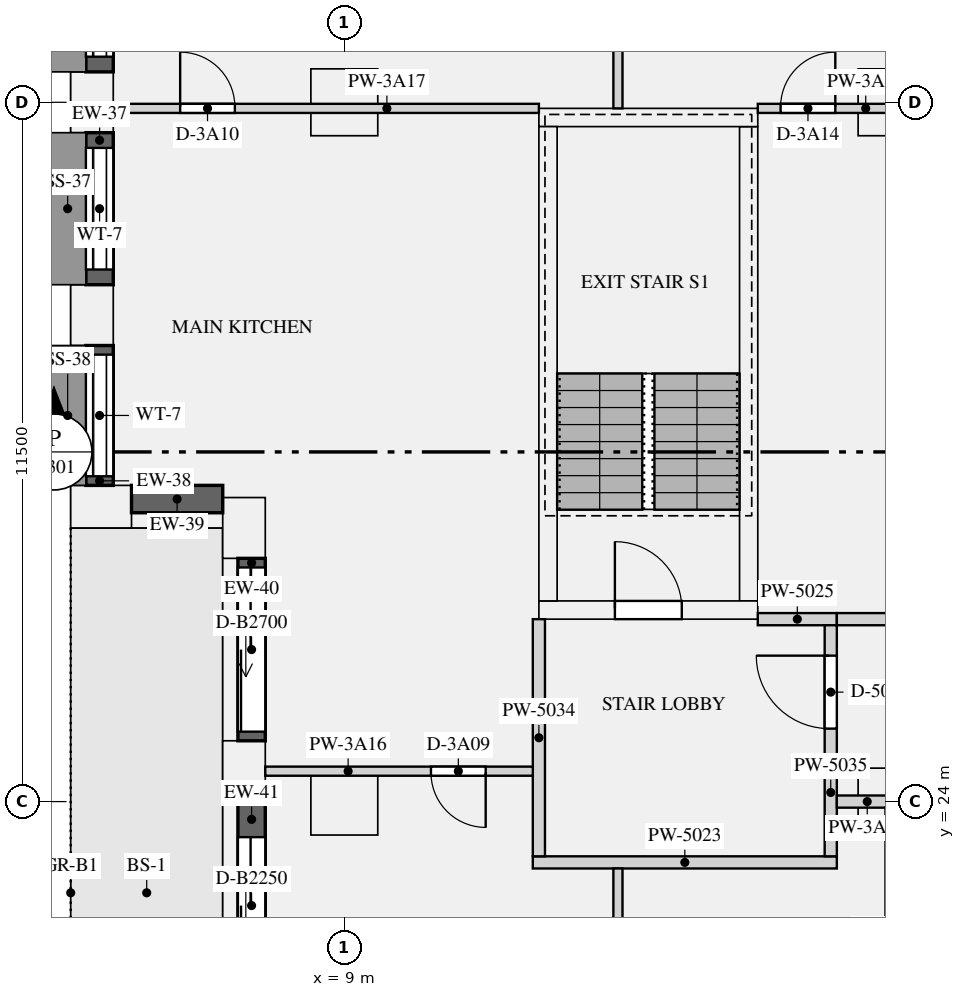
"""IFC4 building model, lengths in metres.
Left out: names, types, materials, properties, quantities, classifications, styles, units other than length and angle.
Written with IfcOpenShell. Run it as: python <this file> out.ifc"""

import sys

from ifc_helpers import new_model, si_unit, direction, frame, frame_2d, origin, origin_2d, place, context, subcontext, project, spatial, rectangle, extrude, element, fill, save


model = new_model("IFC4")
c1 = context("Model", 3, precision=1e-05, world=origin(), true_north=direction((0.0, 1.0)))
c2 = subcontext(c1, "Body", "Model", "MODEL_VIEW")
j1 = project(units=[si_unit("LENGTHUNIT", "METRE"), si_unit("PLANEANGLEUNIT", "RADIAN")], contexts=[c1])
p1 = place(None, origin())
s1 = spatial("IfcSite", under=j1, at=p1, CompositionType="ELEMENT")
p2 = place(p1, origin())
s2 = spatial("IfcBuilding", under=s1, at=p2, CompositionType="ELEMENT")
p3 = place(p2, frame((0.0, 0.0, 141.3)))
s3 = spatial("IfcBuildingStorey", under=s2, at=p3, CompositionType="ELEMENT", Elevation=141.3)
for number, where, z_axis, x_axis in (
    (1, (4.85, 35.5, 0.0), (0.0, 0.0, 1.0), (0.0, -1.0, 0.0)),
    (2, (4.85, 32.0, 0.0), (0.0, 0.0, 1.0), (0.0, -1.0, 0.0)),
    (3, (5.0, 28.85, 0.0), (0.0, 0.0, 1.0), (1.0, 0.0, 0.0)),
    (4, (7.35, 28.5, 0.0), (0.0, 0.0, 1.0), (0.0, -1.0, 0.0)),
    (5, (7.35, 24.5, 0.0), (0.0, 0.0, 1.0), (0.0, -1.0, 0.0)),
):
    element("IfcColumn", number, at=place(p3, frame(where, z_axis=z_axis, x_axis=x_axis)), inside=s3, PredefinedType="USERDEFINED", context=c2, shape_type="SweptSolid", body=[
        extrude(rectangle(XDim=1.0, YDim=0.7, at=origin_2d()), origin(), (0.0, 0.0, 1.0), 3.15),
    ])
for number, where, z_axis, x_axis in (
    (6, (9.0, 24.0, 0.0), (0.0, 0.0, 1.0), (1.0, 0.0, 0.0)),
    (7, (18.0, 24.0, 0.0), (0.0, 0.0, 1.0), (1.0, 0.0, 0.0)),
    (8, (9.0, 35.5, 0.0), (0.0, 0.0, 1.0), (1.0, 0.0, 0.0)),
    (9, (18.0, 35.5, 0.0), (0.0, 0.0, 1.0), (1.0, 0.0, 0.0)),
):
    element("IfcColumn", number, at=place(p3, frame(where, z_axis=z_axis, x_axis=x_axis)), inside=s3, PredefinedType="COLUMN", context=c2, shape_type="SweptSolid", body=[
        extrude(rectangle(XDim=1.1, YDim=1.1, at=origin_2d()), origin(), (0.0, 0.0, 1.0), 3.15),
    ])
p4 = place(p3, frame((12.2, 27.15, 0.0), z_axis=(0.0, 0.0, 1.0), x_axis=(1.0, 0.0, 0.0)))
e10 = element("IfcWall", 10, at=p4, inside=s3, PredefinedType="SHEAR", context=c2, shape_type="SweptSolid", body=[
    extrude(rectangle(XDim=3.6, YDim=0.3, at=frame_2d((1.8, 0.0))), origin(), (0.0, 0.0, 1.0), 3.15),
])
p5 = place(p4, frame((1.25, 0.0, 0.0)))
e11 = element("IfcOpeningElement", 11, at=p5, cuts=e10, PredefinedType="OPENING", context=c2, shape_type="SweptSolid", body=[
    extrude(rectangle(XDim=1.1, YDim=2.1, at=frame_2d((0.55, 1.05))), frame((0.0, 0.16, 0.0), z_axis=(0.0, -1.0, 0.0), x_axis=(1.0, 0.0, 0.0)), (0.0, 0.0, 1.0), 0.32),
])
p6 = place(p3, frame((12.2, 35.25, 0.0), z_axis=(0.0, 0.0, 1.0), x_axis=(1.0, 0.0, 0.0)))
e12 = element("IfcWall", 12, at=p6, inside=s3, PredefinedType="SHEAR", context=c2, shape_type="SweptSolid", body=[
    extrude(rectangle(XDim=3.6, YDim=0.3, at=frame_2d((1.8, 0.0))), origin(), (0.0, 0.0, 1.0), 3.15),
])
for number, where, z_axis, x_axis in (
    (13, (12.35, 27.3, 0.0), (0.0, 0.0, 1.0), (0.0, 1.0, 0.0)),
    (14, (15.65, 27.3, 0.0), (0.0, 0.0, 1.0), (0.0, 1.0, 0.0)),
):
    element("IfcWall", number, at=place(p3, frame(where, z_axis=z_axis, x_axis=x_axis)), inside=s3, PredefinedType="SHEAR", context=c2, shape_type="SweptSolid", body=[
        extrude(rectangle(XDim=7.8, YDim=0.3, at=frame_2d((3.9, 0.0))), origin(), (0.0, 0.0, 1.0), 3.15),
    ])
p7 = place(p3, frame((4.975, 38.0, 0.9), z_axis=(0.0, 0.0, 1.0), x_axis=(0.0, -1.0, 0.0)))
e15 = element("IfcWall", 15, at=p7, inside=s3, PredefinedType="SOLIDWALL", context=c2, shape_type="SweptSolid", body=[
    extrude(rectangle(XDim=2.0, YDim=0.45, at=frame_2d((1.0, 0.0))), origin(), (0.0, 0.0, 1.0), 1.93),
])
p8 = place(p7, frame((0.25, 0.0, 0.15)))
e16 = element("IfcOpeningElement", 16, at=p8, cuts=e15, PredefinedType="OPENING", context=c2, shape_type="SweptSolid", body=[
    extrude(rectangle(XDim=1.5, YDim=1.5, at=frame_2d((0.75, 0.75))), frame((0.0, 0.235, 0.0), z_axis=(0.0, -1.0, 0.0), x_axis=(1.0, 0.0, 0.0)), (0.0, 0.0, 1.0), 0.47),
])
p9 = place(p3, frame((4.975, 35.0, 0.9), z_axis=(0.0, 0.0, 1.0), x_axis=(0.0, -1.0, 0.0)))
e17 = element("IfcWall", 17, at=p9, inside=s3, PredefinedType="SOLIDWALL", context=c2, shape_type="SweptSolid", body=[
    extrude(rectangle(XDim=2.5, YDim=0.45, at=frame_2d((1.25, 0.0))), origin(), (0.0, 0.0, 1.0), 1.93),
])
p10 = place(p9, frame((0.25, 0.0, 0.15)))
e18 = element("IfcOpeningElement", 18, at=p10, cuts=e17, PredefinedType="OPENING", context=c2, shape_type="SweptSolid", body=[
    extrude(rectangle(XDim=2.0, YDim=1.5, at=frame_2d((1.0, 0.75))), frame((0.0, 0.235, 0.0), z_axis=(0.0, -1.0, 0.0), x_axis=(1.0, 0.0, 0.0)), (0.0, 0.0, 1.0), 0.47),
])
p11 = place(p3, frame((4.975, 31.5, 0.9), z_axis=(0.0, 0.0, 1.0), x_axis=(0.0, -1.0, 0.0)))
e19 = element("IfcWall", 19, at=p11, inside=s3, PredefinedType="SOLIDWALL", context=c2, shape_type="SweptSolid", body=[
    extrude(rectangle(XDim=2.3, YDim=0.45, at=frame_2d((1.15, 0.0))), origin(), (0.0, 0.0, 1.0), 1.93),
])
p12 = place(p11, frame((0.15, 0.0, 0.15)))
e20 = element("IfcOpeningElement", 20, at=p12, cuts=e19, PredefinedType="OPENING", context=c2, shape_type="SweptSolid", body=[
    extrude(rectangle(XDim=2.0, YDim=1.5, at=frame_2d((1.0, 0.75))), frame((0.0, 0.235, 0.0), z_axis=(0.0, -1.0, 0.0), x_axis=(1.0, 0.0, 0.0)), (0.0, 0.0, 1.0), 0.47),
])
p13 = place(p3, frame((5.5, 28.975, 0.9), z_axis=(0.0, 0.0, 1.0), x_axis=(1.0, 0.0, 0.0)))
e21 = element("IfcWall", 21, at=p13, inside=s3, PredefinedType="SOLIDWALL", context=c2, shape_type="SweptSolid", body=[
    extrude(rectangle(XDim=1.5, YDim=0.45, at=frame_2d((0.75, 0.0))), origin(), (0.0, 0.0, 1.0), 1.93),
])
p14 = place(p3, frame((7.475, 28.0, 0.0), z_axis=(0.0, 0.0, 1.0), x_axis=(0.0, -1.0, 0.0)))
e22 = element("IfcWall", 22, at=p14, inside=s3, PredefinedType="SOLIDWALL", context=c2, shape_type="SweptSolid", body=[
    extrude(rectangle(XDim=3.0, YDim=0.45, at=frame_2d((1.5, 0.0))), origin(), (0.0, 0.0, 1.0), 2.83),
])
p15 = place(p14, frame((0.15, 0.0, 0.0)))
e23 = element("IfcOpeningElement", 23, at=p15, cuts=e22, PredefinedType="OPENING", context=c2, shape_type="SweptSolid", body=[
    extrude(rectangle(XDim=2.7, YDim=2.3, at=frame_2d((1.35, 1.15))), frame((0.0, 0.235, 0.0), z_axis=(0.0, -1.0, 0.0), x_axis=(1.0, 0.0, 0.0)), (0.0, 0.0, 1.0), 0.47),
])
p16 = place(p3, frame((7.475, 24.0, 0.0), z_axis=(0.0, 0.0, 1.0), x_axis=(0.0, -1.0, 0.0)))
e24 = element("IfcWall", 24, at=p16, inside=s3, PredefinedType="SOLIDWALL", context=c2, shape_type="SweptSolid", body=[
    extrude(rectangle(XDim=3.0, YDim=0.45, at=frame_2d((1.5, 0.0))), origin(), (0.0, 0.0, 1.0), 2.83),
])
p17 = place(p16, frame((0.585, 0.0, 0.0)))
e25 = element("IfcOpeningElement", 25, at=p17, cuts=e24, PredefinedType="OPENING", context=c2, shape_type="SweptSolid", body=[
    extrude(rectangle(XDim=2.25, YDim=2.3, at=frame_2d((1.125, 1.15))), frame((0.0, 0.235, 0.0), z_axis=(0.0, -1.0, 0.0), x_axis=(1.0, 0.0, 0.0)), (0.0, 0.0, 1.0), 0.47),
])
p18 = place(p3, frame((12.1, 23.0, 0.0), z_axis=(0.0, 0.0, 1.0), x_axis=(1.0, 0.0, 0.0)))
e26 = element("IfcWall", 26, at=p18, inside=s3, PredefinedType="PARTITIONING", context=c2, shape_type="SweptSolid", body=[
    extrude(rectangle(XDim=5.0, YDim=0.2, at=frame_2d((2.5, 0.0))), origin(), (0.0, 0.0, 1.0), 2.83),
])
p19 = place(p3, frame((15.8, 27.0, 0.0), z_axis=(0.0, 0.0, 1.0), x_axis=(1.0, 0.0, 0.0)))
e27 = element("IfcWall", 27, at=p19, inside=s3, PredefinedType="PARTITIONING", context=c2, shape_type="SweptSolid", body=[
    extrude(rectangle(XDim=1.3, YDim=0.2, at=frame_2d((0.65, 0.0))), origin(), (0.0, 0.0, 1.0), 2.83),
])
p20 = place(p3, frame((12.2, 23.1, 0.0), z_axis=(0.0, 0.0, 1.0), x_axis=(0.0, 1.0, 0.0)))
e28 = element("IfcWall", 28, at=p20, inside=s3, PredefinedType="PARTITIONING", context=c2, shape_type="SweptSolid", body=[
    extrude(rectangle(XDim=3.9, YDim=0.2, at=frame_2d((1.95, 0.0))), origin(), (0.0, 0.0, 1.0), 2.83),
])
p21 = place(p3, frame((17.0, 23.1, 0.0), z_axis=(0.0, 0.0, 1.0), x_axis=(0.0, 1.0, 0.0)))
e29 = element("IfcWall", 29, at=p21, inside=s3, PredefinedType="PARTITIONING", context=c2, shape_type="SweptSolid", body=[
    extrude(rectangle(XDim=3.8, YDim=0.2, at=frame_2d((1.9, 0.0))), origin(), (0.0, 0.0, 1.0), 2.83),
])
p22 = place(p21, frame((2.1, 0.0, 0.0)))
e30 = element("IfcOpeningElement", 30, at=p22, cuts=e29, PredefinedType="OPENING", context=c2, shape_type="SweptSolid", body=[
    extrude(rectangle(XDim=1.2, YDim=2.1, at=frame_2d((0.6, 1.05))), frame((0.0, 0.11, 0.0), z_axis=(0.0, -1.0, 0.0), x_axis=(1.0, 0.0, 0.0)), (0.0, 0.0, 1.0), 0.22),
])
p23 = place(p3, frame((17.1, 24.0, 0.0), z_axis=(0.0, 0.0, 1.0), x_axis=(1.0, 0.0, 0.0)))
e31 = element("IfcWall", 31, at=p23, inside=s3, PredefinedType="PARTITIONING", context=c2, shape_type="SweptSolid", body=[
    extrude(rectangle(XDim=1.0, YDim=0.2, at=frame_2d((0.5, 0.0))), origin(), (0.0, 0.0, 1.0), 2.83),
])
p24 = place(p3, frame((17.1, 27.0, 0.0), z_axis=(0.0, 0.0, 1.0), x_axis=(1.0, 0.0, 0.0)))
e32 = element("IfcWall", 32, at=p24, inside=s3, PredefinedType="PARTITIONING", context=c2, shape_type="SweptSolid", body=[
    extrude(rectangle(XDim=7.0, YDim=0.2, at=frame_2d((3.5, 0.0))), origin(), (0.0, 0.0, 1.0), 2.83),
])
p25 = place(p3, frame((7.7, 24.5, 0.0), z_axis=(0.0, 0.0, 1.0), x_axis=(1.0, 0.0, 0.0)))
e33 = element("IfcWall", 33, at=p25, inside=s3, PredefinedType="PARTITIONING", context=c2, shape_type="SweptSolid", body=[
    extrude(rectangle(XDim=4.4, YDim=0.15, at=frame_2d((2.2, 0.0))), origin(), (0.0, 0.0, 1.0), 2.83),
])
p26 = place(p25, frame((2.725, 0.0, 0.0)))
e34 = element("IfcOpeningElement", 34, at=p26, cuts=e33, PredefinedType="OPENING", context=c2, shape_type="SweptSolid", body=[
    extrude(rectangle(XDim=0.9, YDim=2.1, at=frame_2d((0.45, 1.05))), frame((0.0, 0.085, 0.0), z_axis=(0.0, -1.0, 0.0), x_axis=(1.0, 0.0, 0.0)), (0.0, 0.0, 1.0), 0.17),
])
p27 = place(p3, frame((5.2, 35.4, 0.0), z_axis=(0.0, 0.0, 1.0), x_axis=(1.0, 0.0, 0.0)))
e35 = element("IfcWall", 35, at=p27, inside=s3, PredefinedType="PARTITIONING", context=c2, shape_type="SweptSolid", body=[
    extrude(rectangle(XDim=7.0, YDim=0.15, at=frame_2d((3.5, 0.0))), origin(), (0.0, 0.0, 1.0), 2.83),
])
p28 = place(p27, frame((1.1, 0.0, 0.0)))
e36 = element("IfcOpeningElement", 36, at=p28, cuts=e35, PredefinedType="OPENING", context=c2, shape_type="SweptSolid", body=[
    extrude(rectangle(XDim=0.9, YDim=2.1, at=frame_2d((0.45, 1.05))), frame((0.0, 0.085, 0.0), z_axis=(0.0, -1.0, 0.0), x_axis=(1.0, 0.0, 0.0)), (0.0, 0.0, 1.0), 0.17),
])
p29 = place(p3, frame((15.8, 35.4, 0.0), z_axis=(0.0, 0.0, 1.0), x_axis=(1.0, 0.0, 0.0)))
e37 = element("IfcWall", 37, at=p29, inside=s3, PredefinedType="PARTITIONING", context=c2, shape_type="SweptSolid", body=[
    extrude(rectangle(XDim=2.275, YDim=0.15, at=frame_2d((1.137, 0.0))), origin(), (0.0, 0.0, 1.0), 2.83),
])
p30 = place(p29, frame((0.375, 0.0, 0.0)))
e38 = element("IfcOpeningElement", 38, at=p30, cuts=e37, PredefinedType="OPENING", context=c2, shape_type="SweptSolid", body=[
    extrude(rectangle(XDim=0.9, YDim=2.1, at=frame_2d((0.45, 1.05))), frame((0.0, 0.085, 0.0), z_axis=(0.0, -1.0, 0.0), x_axis=(1.0, 0.0, 0.0)), (0.0, 0.0, 1.0), 0.17),
])
p31 = place(p3, frame((13.5, 10.575, 0.0), z_axis=(0.0, 0.0, 1.0), x_axis=(0.0, 1.0, 0.0)))
e39 = element("IfcWall", 39, at=p31, inside=s3, PredefinedType="PARTITIONING", context=c2, shape_type="SweptSolid", body=[
    extrude(rectangle(XDim=12.325, YDim=0.15, at=frame_2d((6.163, 0.0))), origin(), (0.0, 0.0, 1.0), 2.83),
])
p32 = place(p31, frame((3.475, 0.0, 0.0)))
e40 = element("IfcOpeningElement", 40, at=p32, cuts=e39, PredefinedType="OPENING", context=c2, shape_type="SweptSolid", body=[
    extrude(rectangle(XDim=0.9, YDim=2.1, at=frame_2d((0.45, 1.05))), frame((0.0, 0.085, 0.0), z_axis=(0.0, -1.0, 0.0), x_axis=(1.0, 0.0, 0.0)), (0.0, 0.0, 1.0), 0.17),
])
p33 = place(p31, frame((8.45, 0.0, 0.0)))
e41 = element("IfcOpeningElement", 41, at=p33, cuts=e39, PredefinedType="OPENING", context=c2, shape_type="SweptSolid", body=[
    extrude(rectangle(XDim=1.5, YDim=2.1, at=frame_2d((0.75, 1.05))), frame((0.0, 0.085, 0.0), z_axis=(0.0, -1.0, 0.0), x_axis=(1.0, 0.0, 0.0)), (0.0, 0.0, 1.0), 0.17),
])
p34 = place(p3, frame((13.5, 35.4, 0.0), z_axis=(0.0, 0.0, 1.0), x_axis=(0.0, 1.0, 0.0)))
e42 = element("IfcWall", 42, at=p34, inside=s3, PredefinedType="PARTITIONING", context=c2, shape_type="SweptSolid", body=[
    extrude(rectangle(XDim=7.4, YDim=0.15, at=frame_2d((3.7, 0.0))), origin(), (0.0, 0.0, 1.0), 2.83),
])
p35 = place(p34, frame((3.025, 0.0, 0.0)))
e43 = element("IfcOpeningElement", 43, at=p35, cuts=e42, PredefinedType="OPENING", context=c2, shape_type="SweptSolid", body=[
    extrude(rectangle(XDim=1.5, YDim=2.1, at=frame_2d((0.75, 1.05))), frame((0.0, 0.085, 0.0), z_axis=(0.0, -1.0, 0.0), x_axis=(1.0, 0.0, 0.0)), (0.0, 0.0, 1.0), 0.17),
])
p36 = place(p8, origin())
e44 = element("IfcWindow", 44, at=p36, inside=s3, PartitioningType="SINGLE_PANEL", PredefinedType="WINDOW", context=c2, shape_type="SweptSolid", body=[
    extrude(rectangle(XDim=1.5, YDim=1.5, at=frame_2d((0.75, 0.75))), frame((0.0, -0.065, 0.0), z_axis=(0.0, -1.0, 0.0), x_axis=(1.0, 0.0, 0.0)), (0.0, 0.0, 1.0), 0.06),
])
fill(e16, e44)
p37 = place(p10, origin())
e45 = element("IfcWindow", 45, at=p37, inside=s3, PartitioningType="SINGLE_PANEL", PredefinedType="WINDOW", context=c2, shape_type="SweptSolid", body=[
    extrude(rectangle(XDim=2.0, YDim=1.5, at=frame_2d((1.0, 0.75))), frame((0.0, -0.065, 0.0), z_axis=(0.0, -1.0, 0.0), x_axis=(1.0, 0.0, 0.0)), (0.0, 0.0, 1.0), 0.06),
])
fill(e18, e45)
p38 = place(p12, origin())
e46 = element("IfcWindow", 46, at=p38, inside=s3, PartitioningType="SINGLE_PANEL", PredefinedType="WINDOW", context=c2, shape_type="SweptSolid", body=[
    extrude(rectangle(XDim=2.0, YDim=1.5, at=frame_2d((1.0, 0.75))), frame((0.0, -0.065, 0.0), z_axis=(0.0, -1.0, 0.0), x_axis=(1.0, 0.0, 0.0)), (0.0, 0.0, 1.0), 0.06),
])
fill(e20, e46)
p39 = place(p15, origin())
e47 = element("IfcDoor", 47, at=p39, inside=s3, OperationType="SLIDING_TO_LEFT", PredefinedType="DOOR", context=c2, shape_type="SweptSolid", body=[
    extrude(rectangle(XDim=2.7, YDim=2.3, at=frame_2d((1.35, 1.15))), frame((0.0, -0.07, 0.0), z_axis=(0.0, -1.0, 0.0), x_axis=(1.0, 0.0, 0.0)), (0.0, 0.0, 1.0), 0.05),
])
fill(e23, e47)
p40 = place(p17, origin())
e48 = element("IfcDoor", 48, at=p40, inside=s3, OperationType="SLIDING_TO_LEFT", PredefinedType="DOOR", context=c2, shape_type="SweptSolid", body=[
    extrude(rectangle(XDim=2.25, YDim=2.3, at=frame_2d((1.125, 1.15))), frame((0.0, -0.07, 0.0), z_axis=(0.0, -1.0, 0.0), x_axis=(1.0, 0.0, 0.0)), (0.0, 0.0, 1.0), 0.05),
])
fill(e25, e48)
p41 = place(p5, origin())
e49 = element("IfcDoor", 49, at=p41, inside=s3, OperationType="SINGLE_SWING_LEFT", PredefinedType="DOOR", context=c2, shape_type="SweptSolid", body=[
    extrude(rectangle(XDim=1.1, YDim=2.1, at=frame_2d((0.55, 1.05))), frame((0.0, 0.025, 0.0), z_axis=(0.0, -1.0, 0.0), x_axis=(1.0, 0.0, 0.0)), (0.0, 0.0, 1.0), 0.05),
])
fill(e11, e49)
p42 = place(p22, origin())
e50 = element("IfcDoor", 50, at=p42, inside=s3, OperationType="SINGLE_SWING_RIGHT", PredefinedType="DOOR", context=c2, shape_type="SweptSolid", body=[
    extrude(rectangle(XDim=1.2, YDim=2.1, at=frame_2d((0.6, 1.05))), frame((0.0, 0.025, 0.0), z_axis=(0.0, -1.0, 0.0), x_axis=(1.0, 0.0, 0.0)), (0.0, 0.0, 1.0), 0.05),
])
fill(e30, e50)
p43 = place(p26, frame((0.9, 0.0, 0.0), z_axis=(0.0, 0.0, 1.0), x_axis=(-1.0, 0.0, 0.0)))
e51 = element("IfcDoor", 51, at=p43, inside=s3, OperationType="SINGLE_SWING_LEFT", PredefinedType="DOOR", context=c2, shape_type="SweptSolid", body=[
    extrude(rectangle(XDim=0.9, YDim=2.1, at=frame_2d((0.45, 1.05))), frame((0.0, 0.025, 0.0), z_axis=(0.0, -1.0, 0.0), x_axis=(1.0, 0.0, 0.0)), (0.0, 0.0, 1.0), 0.05),
])
fill(e34, e51)
p44 = place(p28, origin())
e52 = element("IfcDoor", 52, at=p44, inside=s3, OperationType="SINGLE_SWING_LEFT", PredefinedType="DOOR", context=c2, shape_type="SweptSolid", body=[
    extrude(rectangle(XDim=0.9, YDim=2.1, at=frame_2d((0.45, 1.05))), frame((0.0, 0.025, 0.0), z_axis=(0.0, -1.0, 0.0), x_axis=(1.0, 0.0, 0.0)), (0.0, 0.0, 1.0), 0.05),
])
fill(e36, e52)
p45 = place(p30, origin())
e53 = element("IfcDoor", 53, at=p45, inside=s3, OperationType="SINGLE_SWING_RIGHT", PredefinedType="DOOR", context=c2, shape_type="SweptSolid", body=[
    extrude(rectangle(XDim=0.9, YDim=2.1, at=frame_2d((0.45, 1.05))), frame((0.0, 0.025, 0.0), z_axis=(0.0, -1.0, 0.0), x_axis=(1.0, 0.0, 0.0)), (0.0, 0.0, 1.0), 0.05),
])
fill(e38, e53)
save(model, sys.argv[1])
